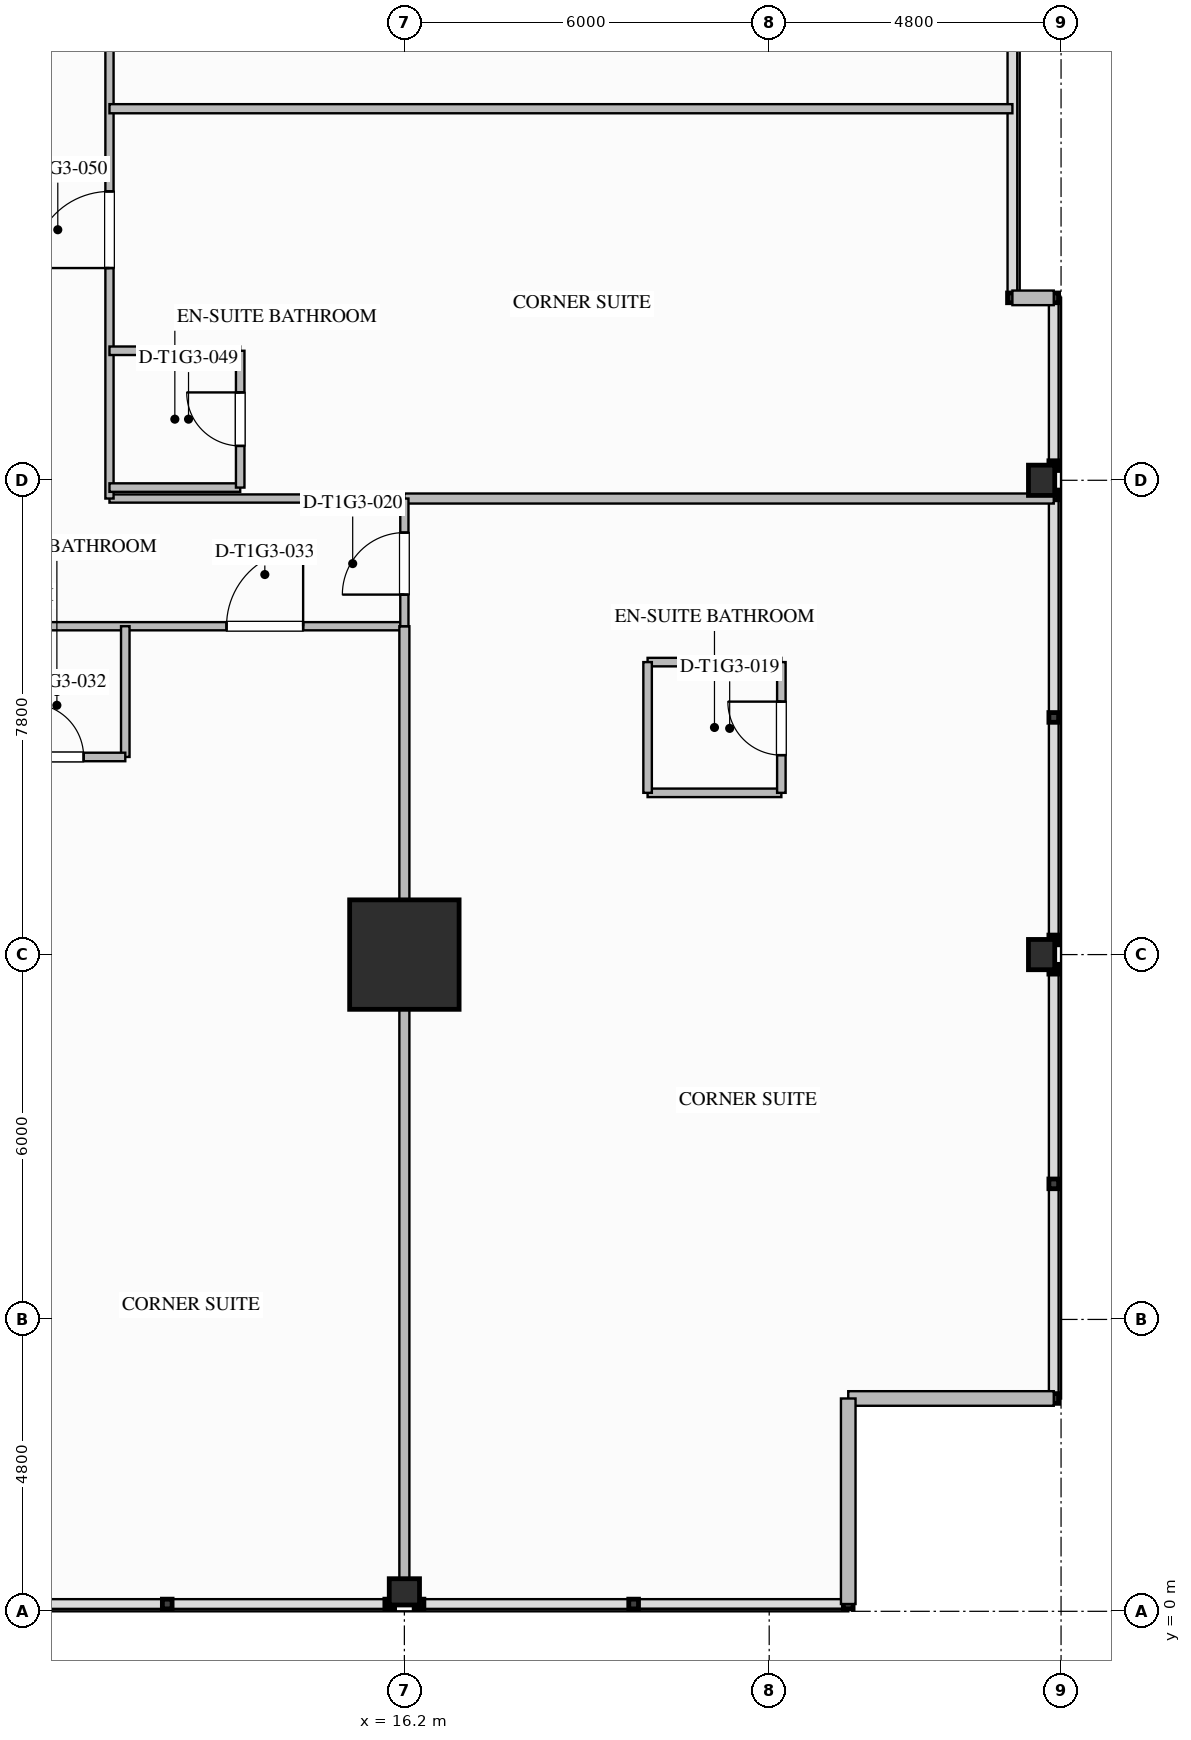
"""IFC4 building model, lengths in metres.
Left out: names, types, materials, properties, quantities, classifications, styles, units other than length and angle.
Written with IfcOpenShell. Run it as: python <this file> out.ifc"""

import sys

from ifc_helpers import new_model, si_unit, direction, frame, frame_2d, origin, origin_2d, place, context, subcontext, project, spatial, rectangle, i_section, extrude, element, fill, save


model = new_model("IFC4")
c1 = context("Model", 3, precision=1e-05, world=origin(), true_north=direction((0.0, 1.0)))
c2 = subcontext(c1, "Body", "Model", "MODEL_VIEW")
j1 = project(units=[si_unit("LENGTHUNIT", "METRE"), si_unit("PLANEANGLEUNIT", "RADIAN")], contexts=[c1])
p1 = place(None, origin())
s1 = spatial("IfcSite", under=j1, at=p1, CompositionType="ELEMENT")
p2 = place(p1, origin())
s2 = spatial("IfcBuilding", under=s1, at=p2, CompositionType="ELEMENT")
p3 = place(p2, frame((0.0, 0.0, 54.2)))
s3 = spatial("IfcBuildingStorey", under=s2, at=p3, CompositionType="ELEMENT", Elevation=54.2)
p4 = place(p3, frame((16.2, 10.8, 0.0), z_axis=(0.0, 0.0, 1.0), x_axis=(1.0, 0.0, 0.0)))
e1 = element("IfcColumn", 1, at=p4, inside=s3, PredefinedType="COLUMN", context=c2, shape_type="SweptSolid", body=[
    extrude(rectangle(XDim=1.8, YDim=1.8, at=origin_2d()), origin(), (0.0, 0.0, 1.0), 3.5),
])
for number, where, z_axis, x_axis in (
    (2, (26.68, 10.8, 0.0), (0.0, 0.0, 1.0), (1.0, 0.0, 0.0)),
    (3, (26.68, 18.6, 0.0), (0.0, 0.0, 1.0), (1.0, 0.0, 0.0)),
    (4, (16.2, 0.32, 0.0), (0.0, 0.0, 1.0), (0.0, 1.0, 0.0)),
):
    element("IfcColumn", number, at=place(p3, frame(where, z_axis=z_axis, x_axis=x_axis)), inside=s3, PredefinedType="COLUMN", context=c2, shape_type="SweptSolid", body=[
        extrude(i_section(OverallWidth=0.432, OverallDepth=0.498, WebThickness=0.056, FlangeThickness=0.089, FilletRadius=0.03, at=origin_2d()), origin(), (0.0, 0.0, 1.0), 3.497),
    ])
for number, where, z_axis, x_axis in (
    (5, (26.88, 3.5, 0.0), (0.0, 0.0, 1.0), (-1.0, 0.0, 0.0)),
    (6, (23.5, 3.5, 0.0), (0.0, 0.0, 1.0), (0.0, -1.0, 0.0)),
):
    element("IfcWall", number, at=place(p3, frame(where, z_axis=z_axis, x_axis=x_axis)), inside=s3, PredefinedType="STANDARD", context=c2, shape_type="SweptSolid", body=[
        extrude(rectangle(XDim=3.38, YDim=0.24, at=frame_2d((1.69, 0.0))), origin(), (0.0, 0.0, 1.0), 3.24),
    ])
p5 = place(p3, frame((26.2, 21.6, 0.0), z_axis=(0.0, 0.0, 1.0), x_axis=(1.0, 0.0, 0.0)))
e7 = element("IfcWall", 7, at=p5, inside=s3, PredefinedType="STANDARD", context=c2, shape_type="SweptSolid", body=[
    extrude(rectangle(XDim=0.68, YDim=0.24, at=frame_2d((0.34, 0.0))), origin(), (0.0, 0.0, 1.0), 3.24),
])
p6 = place(p3, frame((-16.2, 16.2, 0.0), z_axis=(0.0, 0.0, 1.0), x_axis=(1.0, 0.0, 0.0)))
e8 = element("IfcWall", 8, at=p6, inside=s3, PredefinedType="PARTITIONING", context=c2, shape_type="SweptSolid", body=[
    extrude(rectangle(XDim=32.4, YDim=0.135, at=frame_2d((16.2, 0.0))), origin(), (0.0, 0.0, 1.0), 3.24),
])
p7 = place(p6, frame((3.285, 0.0, 0.0)))
e9 = element("IfcOpeningElement", 9, at=p7, cuts=e8, PredefinedType="OPENING", context=c2, shape_type="SweptSolid", body=[
    extrude(rectangle(XDim=1.26, YDim=2.2, at=frame_2d((0.63, 1.1))), frame((0.0, 0.077, 0.0), z_axis=(0.0, -1.0, 0.0), x_axis=(1.0, 0.0, 0.0)), (0.0, 0.0, 1.0), 0.155),
])
p8 = place(p6, frame((7.335, 0.0, 0.0)))
e10 = element("IfcOpeningElement", 10, at=p8, cuts=e8, PredefinedType="OPENING", context=c2, shape_type="SweptSolid", body=[
    extrude(rectangle(XDim=1.26, YDim=2.2, at=frame_2d((0.63, 1.1))), frame((0.0, 0.077, 0.0), z_axis=(0.0, -1.0, 0.0), x_axis=(1.0, 0.0, 0.0)), (0.0, 0.0, 1.0), 0.155),
])
p9 = place(p6, frame((15.84, 0.0, 0.0)))
e11 = element("IfcOpeningElement", 11, at=p9, cuts=e8, PredefinedType="OPENING", context=c2, shape_type="SweptSolid", body=[
    extrude(rectangle(XDim=1.26, YDim=2.2, at=frame_2d((0.63, 1.1))), frame((0.0, 0.077, 0.0), z_axis=(0.0, -1.0, 0.0), x_axis=(1.0, 0.0, 0.0)), (0.0, 0.0, 1.0), 0.155),
])
p10 = place(p6, frame((20.835, 0.0, 0.0)))
e12 = element("IfcOpeningElement", 12, at=p10, cuts=e8, PredefinedType="OPENING", context=c2, shape_type="SweptSolid", body=[
    extrude(rectangle(XDim=1.26, YDim=2.2, at=frame_2d((0.63, 1.1))), frame((0.0, 0.077, 0.0), z_axis=(0.0, -1.0, 0.0), x_axis=(1.0, 0.0, 0.0)), (0.0, 0.0, 1.0), 0.155),
])
p11 = place(p6, frame((29.475, 0.0, 0.0)))
e13 = element("IfcOpeningElement", 13, at=p11, cuts=e8, PredefinedType="OPENING", context=c2, shape_type="SweptSolid", body=[
    extrude(rectangle(XDim=1.26, YDim=2.2, at=frame_2d((0.63, 1.1))), frame((0.0, 0.077, 0.0), z_axis=(0.0, -1.0, 0.0), x_axis=(1.0, 0.0, 0.0)), (0.0, 0.0, 1.0), 0.155),
])
p12 = place(p3, frame((11.35, 18.3, 0.0), z_axis=(0.0, 0.0, 1.0), x_axis=(1.0, 0.0, 0.0)))
e14 = element("IfcWall", 14, at=p12, inside=s3, PredefinedType="PARTITIONING", context=c2, shape_type="SweptSolid", body=[
    extrude(rectangle(XDim=4.85, YDim=0.135, at=frame_2d((2.425, 0.0))), origin(), (0.0, 0.0, 1.0), 3.24),
])
p13 = place(p3, frame((11.35, 18.3, 0.0), z_axis=(0.0, 0.0, 1.0), x_axis=(0.0, 1.0, 0.0)))
e15 = element("IfcWall", 15, at=p13, inside=s3, PredefinedType="PARTITIONING", context=c2, shape_type="SweptSolid", body=[
    extrude(rectangle(XDim=17.4, YDim=0.135, at=frame_2d((8.7, 0.0))), origin(), (0.0, 0.0, 1.0), 3.24),
])
p14 = place(p13, frame((3.79, 0.0, 0.0)))
e16 = element("IfcOpeningElement", 16, at=p14, cuts=e15, PredefinedType="OPENING", context=c2, shape_type="SweptSolid", body=[
    extrude(rectangle(XDim=1.26, YDim=2.2, at=frame_2d((0.63, 1.1))), frame((0.0, 0.077, 0.0), z_axis=(0.0, -1.0, 0.0), x_axis=(1.0, 0.0, 0.0)), (0.0, 0.0, 1.0), 0.155),
])
p15 = place(p13, frame((8.419, 0.0, 0.0)))
e17 = element("IfcOpeningElement", 17, at=p15, cuts=e15, PredefinedType="OPENING", context=c2, shape_type="SweptSolid", body=[
    extrude(rectangle(XDim=1.02, YDim=2.15, at=frame_2d((0.51, 1.075))), frame((0.0, 0.077, 0.0), z_axis=(0.0, -1.0, 0.0), x_axis=(1.0, 0.0, 0.0)), (0.0, 0.0, 1.0), 0.155),
])
p16 = place(p13, frame((15.009, 0.0, 0.0)))
e18 = element("IfcOpeningElement", 18, at=p16, cuts=e15, PredefinedType="OPENING", context=c2, shape_type="SweptSolid", body=[
    extrude(rectangle(XDim=1.26, YDim=2.2, at=frame_2d((0.63, 1.1))), frame((0.0, 0.077, 0.0), z_axis=(0.0, -1.0, 0.0), x_axis=(1.0, 0.0, 0.0)), (0.0, 0.0, 1.0), 0.155),
])
p17 = place(p3, frame((16.2, 0.12, 0.0), z_axis=(0.0, 0.0, 1.0), x_axis=(0.0, 1.0, 0.0)))
e19 = element("IfcWall", 19, at=p17, inside=s3, PredefinedType="PARTITIONING", context=c2, shape_type="SweptSolid", body=[
    extrude(rectangle(XDim=16.08, YDim=0.165, at=frame_2d((8.04, 0.0))), origin(), (0.0, 0.0, 1.0), 2.298),
])
p18 = place(p3, frame((16.2, 18.3, 0.0), z_axis=(0.0, 0.0, 1.0), x_axis=(1.0, 0.0, 0.0)))
e20 = element("IfcWall", 20, at=p18, inside=s3, PredefinedType="PARTITIONING", context=c2, shape_type="SweptSolid", body=[
    extrude(rectangle(XDim=10.68, YDim=0.165, at=frame_2d((5.34, 0.0))), origin(), (0.0, 0.0, 1.0), 2.298),
])
p19 = place(p3, frame((16.2, 16.2, 0.0), z_axis=(0.0, 0.0, 1.0), x_axis=(0.0, 1.0, 0.0)))
e21 = element("IfcWall", 21, at=p19, inside=s3, PredefinedType="PARTITIONING", context=c2, shape_type="SweptSolid", body=[
    extrude(rectangle(XDim=2.1, YDim=0.135, at=frame_2d((1.05, 0.0))), origin(), (0.0, 0.0, 1.0), 2.298),
])
p20 = place(p19, frame((0.52, 0.0, 0.0)))
e22 = element("IfcOpeningElement", 22, at=p20, cuts=e21, PredefinedType="OPENING", context=c2, shape_type="SweptSolid", body=[
    extrude(rectangle(XDim=1.02, YDim=2.15, at=frame_2d((0.51, 1.075))), frame((0.0, 0.077, 0.0), z_axis=(0.0, -1.0, 0.0), x_axis=(1.0, 0.0, 0.0)), (0.0, 0.0, 1.0), 0.155),
])
for number, where, z_axis, x_axis in (
    (23, (20.2, 13.46, 0.0), (0.0, 0.0, 1.0), (1.0, 0.0, 0.0)),
    (24, (20.2, 15.61, 0.0), (0.0, 0.0, 1.0), (1.0, 0.0, 0.0)),
):
    element("IfcWall", number, at=place(p3, frame(where, z_axis=z_axis, x_axis=x_axis)), inside=s3, PredefinedType="PLUMBINGWALL", context=c2, shape_type="SweptSolid", body=[
        extrude(rectangle(XDim=2.2, YDim=0.14, at=frame_2d((1.1, 0.0))), origin(), (0.0, 0.0, 1.0), 3.24),
    ])
p21 = place(p3, frame((20.2, 13.46, 0.0), z_axis=(0.0, 0.0, 1.0), x_axis=(0.0, 1.0, 0.0)))
e25 = element("IfcWall", 25, at=p21, inside=s3, PredefinedType="PLUMBINGWALL", context=c2, shape_type="SweptSolid", body=[
    extrude(rectangle(XDim=2.15, YDim=0.14, at=frame_2d((1.075, 0.0))), origin(), (0.0, 0.0, 1.0), 3.24),
])
p22 = place(p3, frame((22.4, 13.46, 0.0), z_axis=(0.0, 0.0, 1.0), x_axis=(0.0, 1.0, 0.0)))
e26 = element("IfcWall", 26, at=p22, inside=s3, PredefinedType="PLUMBINGWALL", context=c2, shape_type="SweptSolid", body=[
    extrude(rectangle(XDim=2.15, YDim=0.14, at=frame_2d((1.075, 0.0))), origin(), (0.0, 0.0, 1.0), 3.24),
])
p23 = place(p22, frame((0.62, 0.0, 0.0)))
e27 = element("IfcOpeningElement", 27, at=p23, cuts=e26, PredefinedType="OPENING", context=c2, shape_type="SweptSolid", body=[
    extrude(rectangle(XDim=0.88, YDim=2.1, at=frame_2d((0.44, 1.05))), frame((0.0, 0.08, 0.0), z_axis=(0.0, -1.0, 0.0), x_axis=(1.0, 0.0, 0.0)), (0.0, 0.0, 1.0), 0.16),
])
p24 = place(p3, frame((11.61, 16.2, 0.0), z_axis=(0.0, 0.0, 1.0), x_axis=(0.0, -1.0, 0.0)))
e28 = element("IfcWall", 28, at=p24, inside=s3, PredefinedType="PLUMBINGWALL", context=c2, shape_type="SweptSolid", body=[
    extrude(rectangle(XDim=2.15, YDim=0.14, at=frame_2d((1.075, 0.0))), origin(), (0.0, 0.0, 1.0), 3.24),
])
p25 = place(p3, frame((9.36, 14.05, 0.0), z_axis=(0.0, 0.0, 1.0), x_axis=(1.0, 0.0, 0.0)))
e29 = element("IfcWall", 29, at=p25, inside=s3, PredefinedType="PLUMBINGWALL", context=c2, shape_type="SweptSolid", body=[
    extrude(rectangle(XDim=2.25, YDim=0.14, at=frame_2d((1.125, 0.0))), origin(), (0.0, 0.0, 1.0), 3.24),
])
p26 = place(p25, frame((0.685, 0.0, 0.0)))
e30 = element("IfcOpeningElement", 30, at=p26, cuts=e29, PredefinedType="OPENING", context=c2, shape_type="SweptSolid", body=[
    extrude(rectangle(XDim=0.88, YDim=2.1, at=frame_2d((0.44, 1.05))), frame((0.0, 0.08, 0.0), z_axis=(0.0, -1.0, 0.0), x_axis=(1.0, 0.0, 0.0)), (0.0, 0.0, 1.0), 0.16),
])
p27 = place(p3, frame((11.35, 18.48, 0.0), z_axis=(0.0, 0.0, 1.0), x_axis=(1.0, 0.0, 0.0)))
e31 = element("IfcWall", 31, at=p27, inside=s3, PredefinedType="PLUMBINGWALL", context=c2, shape_type="SweptSolid", body=[
    extrude(rectangle(XDim=2.15, YDim=0.14, at=frame_2d((1.075, 0.0))), origin(), (0.0, 0.0, 1.0), 2.617),
])
p28 = place(p3, frame((11.35, 20.73, 0.0), z_axis=(0.0, 0.0, 1.0), x_axis=(1.0, 0.0, 0.0)))
e32 = element("IfcWall", 32, at=p28, inside=s3, PredefinedType="PLUMBINGWALL", context=c2, shape_type="SweptSolid", body=[
    extrude(rectangle(XDim=2.15, YDim=0.14, at=frame_2d((1.075, 0.0))), origin(), (0.0, 0.0, 1.0), 3.24),
])
p29 = place(p3, frame((13.5, 18.48, 0.0), z_axis=(0.0, 0.0, 1.0), x_axis=(0.0, 1.0, 0.0)))
e33 = element("IfcWall", 33, at=p29, inside=s3, PredefinedType="PLUMBINGWALL", context=c2, shape_type="SweptSolid", body=[
    extrude(rectangle(XDim=2.25, YDim=0.14, at=frame_2d((1.125, 0.0))), origin(), (0.0, 0.0, 1.0), 3.24),
])
p30 = place(p29, frame((0.685, 0.0, 0.0)))
e34 = element("IfcOpeningElement", 34, at=p30, cuts=e33, PredefinedType="OPENING", context=c2, shape_type="SweptSolid", body=[
    extrude(rectangle(XDim=0.88, YDim=2.1, at=frame_2d((0.44, 1.05))), frame((0.0, 0.08, 0.0), z_axis=(0.0, -1.0, 0.0), x_axis=(1.0, 0.0, 0.0)), (0.0, 0.0, 1.0), 0.16),
])
p31 = place(p3, frame((11.35, 24.71, 0.0), z_axis=(0.0, 0.0, 1.0), x_axis=(1.0, 0.0, 0.0)))
e35 = element("IfcWall", 35, at=p31, inside=s3, PredefinedType="PARTITIONING", context=c2, shape_type="SweptSolid", body=[
    extrude(rectangle(XDim=14.85, YDim=0.15, at=frame_2d((7.425, 0.0))), origin(), (0.0, 0.0, 1.0), 3.24),
])
p32 = place(p23, origin())
e36 = element("IfcDoor", 36, at=p32, inside=s3, OperationType="SINGLE_SWING_RIGHT", PredefinedType="DOOR", context=c2, shape_type="SweptSolid", body=[
    extrude(rectangle(XDim=0.88, YDim=2.1, at=frame_2d((0.44, 1.05))), frame((0.0, 0.025, 0.0), z_axis=(0.0, -1.0, 0.0), x_axis=(1.0, 0.0, 0.0)), (0.0, 0.0, 1.0), 0.05),
])
fill(e27, e36)
p33 = place(p20, origin())
e37 = element("IfcDoor", 37, at=p33, inside=s3, OperationType="SINGLE_SWING_LEFT", PredefinedType="DOOR", context=c2, shape_type="SweptSolid", body=[
    extrude(rectangle(XDim=1.02, YDim=2.15, at=frame_2d((0.51, 1.075))), frame((0.0, 0.025, 0.0), z_axis=(0.0, -1.0, 0.0), x_axis=(1.0, 0.0, 0.0)), (0.0, 0.0, 1.0), 0.05),
])
fill(e22, e37)
p34 = place(p26, origin())
e38 = element("IfcDoor", 38, at=p34, inside=s3, OperationType="SINGLE_SWING_LEFT", PredefinedType="DOOR", context=c2, shape_type="SweptSolid", body=[
    extrude(rectangle(XDim=0.88, YDim=2.1, at=frame_2d((0.44, 1.05))), frame((0.0, 0.025, 0.0), z_axis=(0.0, -1.0, 0.0), x_axis=(1.0, 0.0, 0.0)), (0.0, 0.0, 1.0), 0.05),
])
fill(e30, e38)
p35 = place(p11, origin())
e39 = element("IfcDoor", 39, at=p35, inside=s3, OperationType="SINGLE_SWING_RIGHT", PredefinedType="DOOR", context=c2, shape_type="SweptSolid", body=[
    extrude(rectangle(XDim=1.26, YDim=2.2, at=frame_2d((0.63, 1.1))), frame((0.0, 0.025, 0.0), z_axis=(0.0, -1.0, 0.0), x_axis=(1.0, 0.0, 0.0)), (0.0, 0.0, 1.0), 0.05),
])
fill(e13, e39)
p36 = place(p30, origin())
e40 = element("IfcDoor", 40, at=p36, inside=s3, OperationType="SINGLE_SWING_RIGHT", PredefinedType="DOOR", context=c2, shape_type="SweptSolid", body=[
    extrude(rectangle(XDim=0.88, YDim=2.1, at=frame_2d((0.44, 1.05))), frame((0.0, 0.025, 0.0), z_axis=(0.0, -1.0, 0.0), x_axis=(1.0, 0.0, 0.0)), (0.0, 0.0, 1.0), 0.05),
])
fill(e34, e40)
p37 = place(p14, origin())
e41 = element("IfcDoor", 41, at=p37, inside=s3, OperationType="SINGLE_SWING_LEFT", PredefinedType="DOOR", context=c2, shape_type="SweptSolid", body=[
    extrude(rectangle(XDim=1.26, YDim=2.2, at=frame_2d((0.63, 1.1))), frame((0.0, 0.025, 0.0), z_axis=(0.0, -1.0, 0.0), x_axis=(1.0, 0.0, 0.0)), (0.0, 0.0, 1.0), 0.05),
])
fill(e16, e41)
save(model, sys.argv[1])
